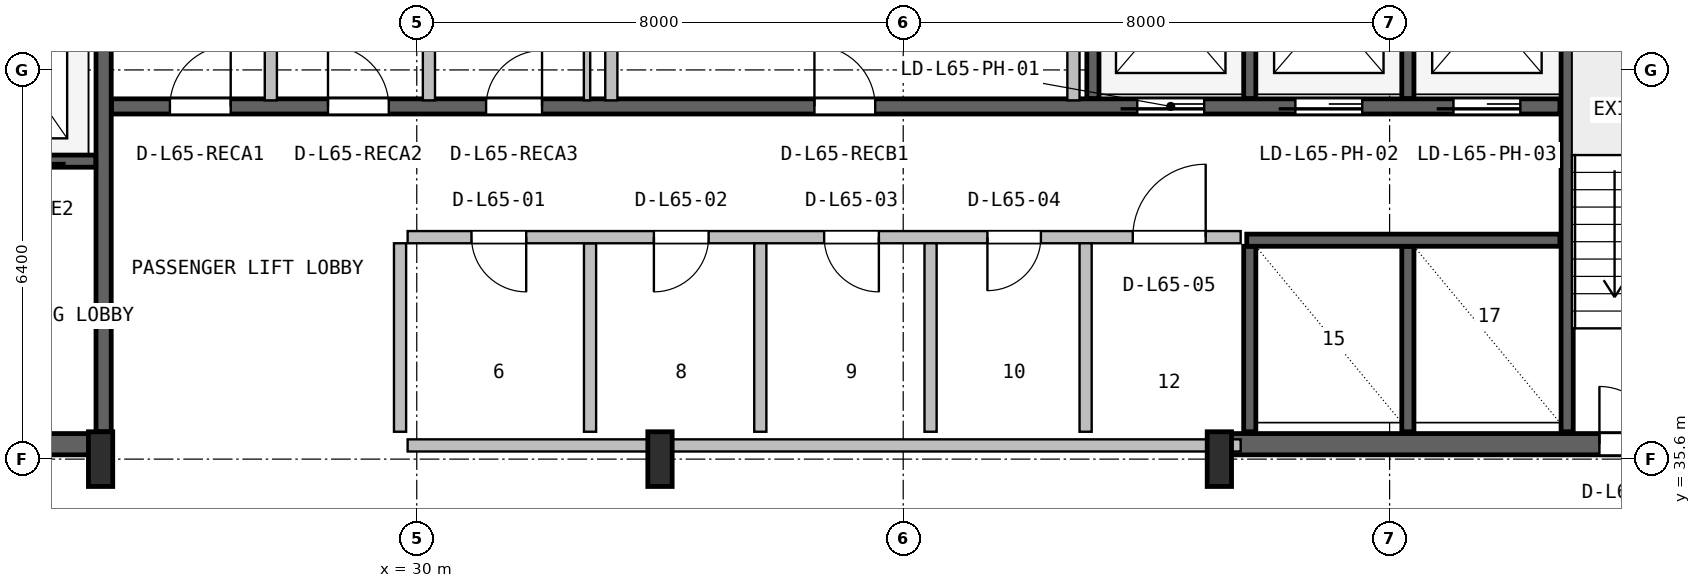
"""IFC4 building model, lengths in metres.
Left out: names, types, materials, properties, quantities, classifications, styles, units other than length and angle.
Written with IfcOpenShell. Run it as: python <this file> out.ifc"""

import sys

from ifc_helpers import new_model, si_unit, direction, frame, frame_2d, origin, origin_2d, place, context, subcontext, project, spatial, rectangle, i_section, extrude, source, transform, mapped, element, fill, save


model = new_model("IFC4")
c1 = context("Model", 3, precision=1e-05, world=origin(), true_north=direction((0.0, 1.0)))
c2 = subcontext(c1, "Body", "Model", "MODEL_VIEW")
j1 = project(units=[si_unit("LENGTHUNIT", "METRE"), si_unit("PLANEANGLEUNIT", "RADIAN")], contexts=[c1])
p1 = place(None, origin())
s1 = spatial("IfcSite", under=j1, at=p1, CompositionType="ELEMENT")
p2 = place(p1, origin())
s2 = spatial("IfcBuilding", under=s1, at=p2, CompositionType="ELEMENT")
p3 = place(p2, frame((0.0, 0.0, 262.2)))
s3 = spatial("IfcBuildingStorey", under=s2, at=p3, CompositionType="ELEMENT", Elevation=262.2)
p4 = place(p3, frame((15.67, 35.845, 0.0), z_axis=(0.0, 0.0, 1.0), x_axis=(1.0, 0.0, 0.0)))
e1 = element("IfcWall", 1, at=p4, inside=s3, PredefinedType="SHEAR", context=c2, shape_type="SweptSolid", body=[
    extrude(rectangle(XDim=9.13, YDim=0.35, at=frame_2d((4.565, 0.0))), origin(), (0.0, 0.0, 1.0), 3.55),
])
p5 = place(p4, frame((5.4, 0.0, 0.0)))
e2 = element("IfcOpeningElement", 2, at=p5, cuts=e1, PredefinedType="OPENING", context=c2, shape_type="SweptSolid", body=[
    extrude(rectangle(XDim=1.0, YDim=2.1, at=frame_2d((0.5, 1.05))), frame((0.0, 0.185, 0.0), z_axis=(0.0, -1.0, 0.0), x_axis=(1.0, 0.0, 0.0)), (0.0, 0.0, 1.0), 0.37),
])
p6 = place(p3, frame((43.2, 35.845, 0.0), z_axis=(0.0, 0.0, 1.0), x_axis=(1.0, 0.0, 0.0)))
e3 = element("IfcWall", 3, at=p6, inside=s3, PredefinedType="SHEAR", context=c2, shape_type="SweptSolid", body=[
    extrude(rectangle(XDim=9.13, YDim=0.35, at=frame_2d((4.565, 0.0))), origin(), (0.0, 0.0, 1.0), 3.55),
])
p7 = place(p6, frame((6.25, 0.0, 0.0)))
e4 = element("IfcOpeningElement", 4, at=p7, cuts=e3, PredefinedType="OPENING", context=c2, shape_type="SweptSolid", body=[
    extrude(rectangle(XDim=0.95, YDim=2.1, at=frame_2d((0.475, 1.05))), frame((0.0, 0.185, 0.0), z_axis=(0.0, -1.0, 0.0), x_axis=(1.0, 0.0, 0.0)), (0.0, 0.0, 1.0), 0.37),
])
m1 = source(origin(), c2, "Body", "SweptSolid", [
    extrude(i_section(OverallWidth=0.4, OverallDepth=0.9, WebThickness=0.016, FlangeThickness=0.028, FilletRadius=0.016, at=origin_2d()), origin(), (0.0, 0.0, 1.0), 3.8),
])
for number, where, z_axis, x_axis in (
    (5, (24.8, 35.6, 0.0), (0.0, 0.0, 1.0), (1.0, 0.0, 0.0)),
    (6, (34.0, 35.6, 0.0), (0.0, 0.0, 1.0), (1.0, 0.0, 0.0)),
    (7, (43.2, 35.6, 0.0), (0.0, 0.0, 1.0), (1.0, 0.0, 0.0)),
):
    element("IfcColumn", number, at=place(p3, frame(where, z_axis=z_axis, x_axis=x_axis)), inside=s3, PredefinedType="COLUMN", context=c2, shape_type="MappedRepresentation", body=[
        mapped(m1, transform((0.0, 0.0, 0.0), x_axis=(1.0, 0.0, 0.0), y_axis=(0.0, 1.0, 0.0), z_axis=(0.0, 0.0, 1.0), scale=1.0)),
    ])
p8 = place(p3, frame((24.85, 36.05, 0.0), z_axis=(0.0, 0.0, 1.0), x_axis=(0.0, 1.0, 0.0)))
e8 = element("IfcWall", 8, at=p8, inside=s3, PredefinedType="SHEAR", context=c2, shape_type="SweptSolid", body=[
    extrude(rectangle(XDim=10.45, YDim=0.25, at=frame_2d((5.225, 0.0))), origin(), (0.0, 0.0, 1.0), 3.55),
])
p9 = place(p3, frame((19.2, 40.5, 0.0), z_axis=(0.0, 0.0, 1.0), x_axis=(1.0, 0.0, 0.0)))
e9 = element("IfcWall", 9, at=p9, inside=s3, PredefinedType="SHEAR", context=c2, shape_type="SweptSolid", body=[
    extrude(rectangle(XDim=5.52, YDim=0.2, at=frame_2d((2.76, 0.0))), origin(), (0.0, 0.0, 1.0), 3.55),
])
p10 = place(p9, frame((1.05, 0.0, 0.0)))
e10 = element("IfcOpeningElement", 10, at=p10, cuts=e9, PredefinedType="OPENING", context=c2, shape_type="SweptSolid", body=[
    extrude(rectangle(XDim=1.1, YDim=2.18, at=frame_2d((0.55, 1.09))), frame((0.0, 0.11, 0.0), z_axis=(0.0, -1.0, 0.0), x_axis=(1.0, 0.0, 0.0)), (0.0, 0.0, 1.0), 0.22),
])
p11 = place(p9, frame((3.65, 0.0, 0.0)))
e11 = element("IfcOpeningElement", 11, at=p11, cuts=e9, PredefinedType="OPENING", context=c2, shape_type="SweptSolid", body=[
    extrude(rectangle(XDim=1.1, YDim=2.18, at=frame_2d((0.55, 1.09))), frame((0.0, 0.11, 0.0), z_axis=(0.0, -1.0, 0.0), x_axis=(1.0, 0.0, 0.0)), (0.0, 0.0, 1.0), 0.22),
])
p12 = place(p3, frame((48.92, 36.05, 0.0), z_axis=(0.0, 0.0, 1.0), x_axis=(0.0, 1.0, 0.0)))
e12 = element("IfcWall", 12, at=p12, inside=s3, PredefinedType="SHEAR", context=c2, shape_type="SweptSolid", body=[
    extrude(rectangle(XDim=10.5, YDim=0.2, at=frame_2d((5.25, 0.0))), origin(), (0.0, 0.0, 1.0), 3.55),
])
p13 = place(p3, frame((24.98, 41.4, 0.0), z_axis=(0.0, 0.0, 1.0), x_axis=(1.0, 0.0, 0.0)))
e13 = element("IfcWall", 13, at=p13, inside=s3, PredefinedType="SHEAR", context=c2, shape_type="SweptSolid", body=[
    extrude(rectangle(XDim=23.82, YDim=0.25, at=frame_2d((11.91, 0.0))), origin(), (0.0, 0.0, 1.0), 3.55),
])
p14 = place(p13, frame((16.87, 0.0, 0.0)))
e14 = element("IfcOpeningElement", 14, at=p14, cuts=e13, PredefinedType="OPENING", context=c2, shape_type="SweptSolid", body=[
    extrude(rectangle(XDim=1.1, YDim=2.18, at=frame_2d((0.55, 1.09))), frame((0.0, 0.135, 0.0), z_axis=(0.0, -1.0, 0.0), x_axis=(1.0, 0.0, 0.0)), (0.0, 0.0, 1.0), 0.27),
])
p15 = place(p13, frame((19.47, 0.0, 0.0)))
e15 = element("IfcOpeningElement", 15, at=p15, cuts=e13, PredefinedType="OPENING", context=c2, shape_type="SweptSolid", body=[
    extrude(rectangle(XDim=1.1, YDim=2.18, at=frame_2d((0.55, 1.09))), frame((0.0, 0.135, 0.0), z_axis=(0.0, -1.0, 0.0), x_axis=(1.0, 0.0, 0.0)), (0.0, 0.0, 1.0), 0.27),
])
p16 = place(p13, frame((22.07, 0.0, 0.0)))
e16 = element("IfcOpeningElement", 16, at=p16, cuts=e13, PredefinedType="OPENING", context=c2, shape_type="SweptSolid", body=[
    extrude(rectangle(XDim=1.1, YDim=2.18, at=frame_2d((0.55, 1.09))), frame((0.0, 0.135, 0.0), z_axis=(0.0, -1.0, 0.0), x_axis=(1.0, 0.0, 0.0)), (0.0, 0.0, 1.0), 0.27),
])
p17 = place(p13, frame((0.96, 0.0, 0.0)))
e17 = element("IfcOpeningElement", 17, at=p17, cuts=e13, PredefinedType="OPENING", context=c2, shape_type="SweptSolid", body=[
    extrude(rectangle(XDim=1.0, YDim=2.08, at=frame_2d((0.5, 1.04))), frame((0.0, 0.135, 0.0), z_axis=(0.0, -1.0, 0.0), x_axis=(1.0, 0.0, 0.0)), (0.0, 0.0, 1.0), 0.27),
])
p18 = place(p13, frame((3.56, 0.0, 0.0)))
e18 = element("IfcOpeningElement", 18, at=p18, cuts=e13, PredefinedType="OPENING", context=c2, shape_type="SweptSolid", body=[
    extrude(rectangle(XDim=1.0, YDim=2.08, at=frame_2d((0.5, 1.04))), frame((0.0, 0.135, 0.0), z_axis=(0.0, -1.0, 0.0), x_axis=(1.0, 0.0, 0.0)), (0.0, 0.0, 1.0), 0.27),
])
p19 = place(p13, frame((6.16, 0.0, 0.0)))
e19 = element("IfcOpeningElement", 19, at=p19, cuts=e13, PredefinedType="OPENING", context=c2, shape_type="SweptSolid", body=[
    extrude(rectangle(XDim=0.92, YDim=2.08, at=frame_2d((0.46, 1.04))), frame((0.0, 0.135, 0.0), z_axis=(0.0, -1.0, 0.0), x_axis=(1.0, 0.0, 0.0)), (0.0, 0.0, 1.0), 0.27),
])
p20 = place(p13, frame((11.56, 0.0, 0.0)))
e20 = element("IfcOpeningElement", 20, at=p20, cuts=e13, PredefinedType="OPENING", context=c2, shape_type="SweptSolid", body=[
    extrude(rectangle(XDim=1.0, YDim=2.08, at=frame_2d((0.5, 1.04))), frame((0.0, 0.135, 0.0), z_axis=(0.0, -1.0, 0.0), x_axis=(1.0, 0.0, 0.0)), (0.0, 0.0, 1.0), 0.27),
])
p21 = place(p3, frame((41.12, 41.53, 0.0), z_axis=(0.0, 0.0, 1.0), x_axis=(0.0, 1.0, 0.0)))
e21 = element("IfcWall", 21, at=p21, inside=s3, PredefinedType="SHEAR", context=c2, shape_type="SweptSolid", body=[
    extrude(rectangle(XDim=5.02, YDim=0.2, at=frame_2d((2.51, 0.0))), origin(), (0.0, 0.0, 1.0), 3.55),
])
for number, where, z_axis, x_axis in (
    (22, (43.7, 41.53, 0.0), (0.0, 0.0, 1.0), (0.0, 1.0, 0.0)),
    (23, (46.3, 41.53, 0.0), (0.0, 0.0, 1.0), (0.0, 1.0, 0.0)),
):
    element("IfcWall", number, at=place(p3, frame(where, z_axis=z_axis, x_axis=x_axis)), inside=s3, PredefinedType="SHEAR", context=c2, shape_type="SweptSolid", body=[
        extrude(rectangle(XDim=2.87, YDim=0.2, at=frame_2d((1.435, 0.0))), origin(), (0.0, 0.0, 1.0), 3.55),
    ])
for number, where, z_axis, x_axis in (
    (24, (43.7, 36.05, 0.0), (0.0, 0.0, 1.0), (0.0, 1.0, 0.0)),
    (25, (46.3, 36.05, 0.0), (0.0, 0.0, 1.0), (0.0, 1.0, 0.0)),
):
    element("IfcWall", number, at=place(p3, frame(where, z_axis=z_axis, x_axis=x_axis)), inside=s3, PredefinedType="SHEAR", context=c2, shape_type="SweptSolid", body=[
        extrude(rectangle(XDim=3.05, YDim=0.2, at=frame_2d((1.525, 0.0))), origin(), (0.0, 0.0, 1.0), 3.55),
    ])
p22 = place(p3, frame((43.65, 39.2, 0.0), z_axis=(0.0, 0.0, 1.0), x_axis=(1.0, 0.0, 0.0)))
e26 = element("IfcWall", 26, at=p22, inside=s3, PredefinedType="SHEAR", context=c2, shape_type="SweptSolid", body=[
    extrude(rectangle(XDim=5.15, YDim=0.2, at=frame_2d((2.575, 0.0))), origin(), (0.0, 0.0, 1.0), 3.55),
])
p23 = place(p3, frame((29.85, 35.825, 0.0), z_axis=(0.0, 0.0, 1.0), x_axis=(1.0, 0.0, 0.0)))
e27 = element("IfcWall", 27, at=p23, inside=s3, PredefinedType="SOLIDWALL", context=c2, shape_type="SweptSolid", body=[
    extrude(rectangle(XDim=13.7, YDim=0.2, at=frame_2d((6.85, 0.0))), origin(), (0.0, 0.0, 1.0), 2.575),
])
p24 = place(p3, frame((32.85, 36.05, 0.0), z_axis=(0.0, 0.0, 1.0), x_axis=(0.0, 1.0, 0.0)))
e28 = element("IfcWall", 28, at=p24, inside=s3, PredefinedType="PLUMBINGWALL", context=c2, shape_type="SweptSolid", body=[
    extrude(rectangle(XDim=3.1, YDim=0.2, at=frame_2d((1.55, 0.0))), origin(), (0.0, 0.0, 1.0), 3.53),
])
p25 = place(p3, frame((29.85, 39.25, 0.0), z_axis=(0.0, 0.0, 1.0), x_axis=(1.0, 0.0, 0.0)))
e29 = element("IfcWall", 29, at=p25, inside=s3, PredefinedType="SOLIDWALL", context=c2, shape_type="SweptSolid", body=[
    extrude(rectangle(XDim=13.7, YDim=0.2, at=frame_2d((6.85, 0.0))), origin(), (0.0, 0.0, 1.0), 3.53),
])
p26 = place(p25, frame((1.05, 0.0, 0.0)))
e30 = element("IfcOpeningElement", 30, at=p26, cuts=e29, PredefinedType="OPENING", context=c2, shape_type="SweptSolid", body=[
    extrude(rectangle(XDim=0.9, YDim=2.06, at=frame_2d((0.45, 1.03))), frame((0.0, 0.11, 0.0), z_axis=(0.0, -1.0, 0.0), x_axis=(1.0, 0.0, 0.0)), (0.0, 0.0, 1.0), 0.22),
])
p27 = place(p25, frame((4.05, 0.0, 0.0)))
e31 = element("IfcOpeningElement", 31, at=p27, cuts=e29, PredefinedType="OPENING", context=c2, shape_type="SweptSolid", body=[
    extrude(rectangle(XDim=0.9, YDim=2.06, at=frame_2d((0.45, 1.03))), frame((0.0, 0.11, 0.0), z_axis=(0.0, -1.0, 0.0), x_axis=(1.0, 0.0, 0.0)), (0.0, 0.0, 1.0), 0.22),
])
p28 = place(p25, frame((6.85, 0.0, 0.0)))
e32 = element("IfcOpeningElement", 32, at=p28, cuts=e29, PredefinedType="OPENING", context=c2, shape_type="SweptSolid", body=[
    extrude(rectangle(XDim=0.9, YDim=2.06, at=frame_2d((0.45, 1.03))), frame((0.0, 0.11, 0.0), z_axis=(0.0, -1.0, 0.0), x_axis=(1.0, 0.0, 0.0)), (0.0, 0.0, 1.0), 0.22),
])
p29 = place(p25, frame((9.535, 0.0, 0.0)))
e33 = element("IfcOpeningElement", 33, at=p29, cuts=e29, PredefinedType="OPENING", context=c2, shape_type="SweptSolid", body=[
    extrude(rectangle(XDim=0.88, YDim=2.06, at=frame_2d((0.44, 1.03))), frame((0.0, 0.11, 0.0), z_axis=(0.0, -1.0, 0.0), x_axis=(1.0, 0.0, 0.0)), (0.0, 0.0, 1.0), 0.22),
])
p30 = place(p25, frame((11.925, 0.0, 0.0)))
e34 = element("IfcOpeningElement", 34, at=p30, cuts=e29, PredefinedType="OPENING", context=c2, shape_type="SweptSolid", body=[
    extrude(rectangle(XDim=1.2, YDim=2.1, at=frame_2d((0.6, 1.05))), frame((0.0, 0.11, 0.0), z_axis=(0.0, -1.0, 0.0), x_axis=(1.0, 0.0, 0.0)), (0.0, 0.0, 1.0), 0.22),
])
for number, where, z_axis, x_axis in (
    (35, (29.725, 36.05, 0.0), (0.0, 0.0, 1.0), (0.0, 1.0, 0.0)),
    (36, (35.65, 36.05, 0.0), (0.0, 0.0, 1.0), (0.0, 1.0, 0.0)),
    (37, (38.45, 36.05, 0.0), (0.0, 0.0, 1.0), (0.0, 1.0, 0.0)),
):
    element("IfcWall", number, at=place(p3, frame(where, z_axis=z_axis, x_axis=x_axis)), inside=s3, PredefinedType="PLUMBINGWALL", context=c2, shape_type="SweptSolid", body=[
        extrude(rectangle(XDim=3.1, YDim=0.2, at=frame_2d((1.55, 0.0))), origin(), (0.0, 0.0, 1.0), 3.53),
    ])
p31 = place(p3, frame((41.0, 36.05, 0.0), z_axis=(0.0, 0.0, 1.0), x_axis=(0.0, 1.0, 0.0)))
e38 = element("IfcWall", 38, at=p31, inside=s3, PredefinedType="SOLIDWALL", context=c2, shape_type="SweptSolid", body=[
    extrude(rectangle(XDim=3.1, YDim=0.2, at=frame_2d((1.55, 0.0))), origin(), (0.0, 0.0, 1.0), 3.53),
])
for number, where, z_axis, x_axis in (
    (39, (27.6, 41.5, 0.0), (0.0, 0.0, 1.0), (0.0, 1.0, 0.0)),
    (40, (30.2, 41.5, 0.0), (0.0, 0.0, 1.0), (0.0, 1.0, 0.0)),
):
    element("IfcWall", number, at=place(p3, frame(where, z_axis=z_axis, x_axis=x_axis)), inside=s3, PredefinedType="SOLIDWALL", context=c2, shape_type="SweptSolid", body=[
        extrude(rectangle(XDim=5.02, YDim=0.2, at=frame_2d((2.51, 0.0))), origin(), (0.0, 0.0, 1.0), 3.53),
    ])
p32 = place(p3, frame((32.8, 41.5, 0.0), z_axis=(0.0, 0.0, 1.0), x_axis=(0.0, 1.0, 0.0)))
e41 = element("IfcWall", 41, at=p32, inside=s3, PredefinedType="PARTITIONING", context=c2, shape_type="SweptSolid", body=[
    extrude(rectangle(XDim=5.02, YDim=0.105, at=frame_2d((2.51, 0.0))), origin(), (0.0, 0.0, 1.0), 3.53),
])
for number, where, z_axis, x_axis in (
    (42, (40.8, 41.5, 0.0), (0.0, 0.0, 1.0), (0.0, 1.0, 0.0)),
    (43, (33.2, 41.5, 0.0), (0.0, 0.0, 1.0), (0.0, 1.0, 0.0)),
):
    element("IfcWall", number, at=place(p3, frame(where, z_axis=z_axis, x_axis=x_axis)), inside=s3, PredefinedType="SOLIDWALL", context=c2, shape_type="SweptSolid", body=[
        extrude(rectangle(XDim=5.02, YDim=0.2, at=frame_2d((2.51, 0.0))), origin(), (0.0, 0.0, 1.0), 3.53),
    ])
m2 = source(origin(), c2, "Body", "SweptSolid", [
    extrude(rectangle(XDim=0.95, YDim=2.1, at=frame_2d((0.475, 1.05))), frame((0.0, 0.025, 0.0), z_axis=(0.0, -1.0, 0.0), x_axis=(1.0, 0.0, 0.0)), (0.0, 0.0, 1.0), 0.05),
])
p33 = place(p7, origin())
e44 = element("IfcDoor", 44, at=p33, inside=s3, OperationType="SINGLE_SWING_LEFT", PredefinedType="DOOR", context=c2, shape_type="MappedRepresentation", body=[
    mapped(m2, transform((0.0, 0.0, 0.0), x_axis=(1.0, 0.0, 0.0), y_axis=(0.0, 1.0, 0.0), z_axis=(0.0, 0.0, 1.0), scale=1.0)),
])
fill(e4, e44)
m3 = source(origin(), c2, "Body", "SweptSolid", [
    extrude(rectangle(XDim=1.1, YDim=2.18, at=frame_2d((0.55, 1.09))), frame((0.0, 0.025, 0.0), z_axis=(0.0, -1.0, 0.0), x_axis=(1.0, 0.0, 0.0)), (0.0, 0.0, 1.0), 0.05),
])
p34 = place(p14, frame((1.1, 0.0, 0.0), z_axis=(0.0, 0.0, 1.0), x_axis=(-1.0, 0.0, 0.0)))
e45 = element("IfcDoor", 45, at=p34, inside=s3, OperationType="SLIDING_TO_LEFT", PredefinedType="DOOR", context=c2, shape_type="MappedRepresentation", body=[
    mapped(m3, transform((0.0, 0.0, 0.0), x_axis=(1.0, 0.0, 0.0), y_axis=(0.0, 1.0, 0.0), z_axis=(0.0, 0.0, 1.0), scale=1.0)),
])
fill(e14, e45)
p35 = place(p15, frame((1.1, 0.0, 0.0), z_axis=(0.0, 0.0, 1.0), x_axis=(-1.0, 0.0, 0.0)))
e46 = element("IfcDoor", 46, at=p35, inside=s3, OperationType="SLIDING_TO_LEFT", PredefinedType="DOOR", context=c2, shape_type="MappedRepresentation", body=[
    mapped(m3, transform((0.0, 0.0, 0.0), x_axis=(1.0, 0.0, 0.0), y_axis=(0.0, 1.0, 0.0), z_axis=(0.0, 0.0, 1.0), scale=1.0)),
])
fill(e15, e46)
p36 = place(p16, frame((1.1, 0.0, 0.0), z_axis=(0.0, 0.0, 1.0), x_axis=(-1.0, 0.0, 0.0)))
e47 = element("IfcDoor", 47, at=p36, inside=s3, OperationType="SLIDING_TO_LEFT", PredefinedType="DOOR", context=c2, shape_type="MappedRepresentation", body=[
    mapped(m3, transform((0.0, 0.0, 0.0), x_axis=(1.0, 0.0, 0.0), y_axis=(0.0, 1.0, 0.0), z_axis=(0.0, 0.0, 1.0), scale=1.0)),
])
fill(e16, e47)
m4 = source(origin(), c2, "Body", "SweptSolid", [
    extrude(rectangle(XDim=1.0, YDim=2.08, at=frame_2d((0.5, 1.04))), frame((0.0, 0.025, 0.0), z_axis=(0.0, -1.0, 0.0), x_axis=(1.0, 0.0, 0.0)), (0.0, 0.0, 1.0), 0.05),
])
p37 = place(p17, origin())
e48 = element("IfcDoor", 48, at=p37, inside=s3, OperationType="SINGLE_SWING_RIGHT", PredefinedType="DOOR", context=c2, shape_type="MappedRepresentation", body=[
    mapped(m4, transform((0.0, 0.0, 0.0), x_axis=(1.0, 0.0, 0.0), y_axis=(0.0, 1.0, 0.0), z_axis=(0.0, 0.0, 1.0), scale=1.0)),
])
fill(e17, e48)
p38 = place(p18, origin())
e49 = element("IfcDoor", 49, at=p38, inside=s3, OperationType="SINGLE_SWING_LEFT", PredefinedType="DOOR", context=c2, shape_type="MappedRepresentation", body=[
    mapped(m4, transform((0.0, 0.0, 0.0), x_axis=(1.0, 0.0, 0.0), y_axis=(0.0, 1.0, 0.0), z_axis=(0.0, 0.0, 1.0), scale=1.0)),
])
fill(e18, e49)
m5 = source(origin(), c2, "Body", "SweptSolid", [
    extrude(rectangle(XDim=0.92, YDim=2.08, at=frame_2d((0.46, 1.04))), frame((0.0, 0.025, 0.0), z_axis=(0.0, -1.0, 0.0), x_axis=(1.0, 0.0, 0.0)), (0.0, 0.0, 1.0), 0.05),
])
p39 = place(p19, origin())
e50 = element("IfcDoor", 50, at=p39, inside=s3, OperationType="SINGLE_SWING_RIGHT", PredefinedType="DOOR", context=c2, shape_type="MappedRepresentation", body=[
    mapped(m5, transform((0.0, 0.0, 0.0), x_axis=(1.0, 0.0, 0.0), y_axis=(0.0, 1.0, 0.0), z_axis=(0.0, 0.0, 1.0), scale=1.0)),
])
fill(e19, e50)
p40 = place(p20, origin())
e51 = element("IfcDoor", 51, at=p40, inside=s3, OperationType="SINGLE_SWING_LEFT", PredefinedType="DOOR", context=c2, shape_type="MappedRepresentation", body=[
    mapped(m4, transform((0.0, 0.0, 0.0), x_axis=(1.0, 0.0, 0.0), y_axis=(0.0, 1.0, 0.0), z_axis=(0.0, 0.0, 1.0), scale=1.0)),
])
fill(e20, e51)
m6 = source(origin(), c2, "Body", "SweptSolid", [
    extrude(rectangle(XDim=0.9, YDim=2.06, at=frame_2d((0.45, 1.03))), frame((0.0, 0.025, 0.0), z_axis=(0.0, -1.0, 0.0), x_axis=(1.0, 0.0, 0.0)), (0.0, 0.0, 1.0), 0.05),
])
p41 = place(p26, frame((0.9, 0.0, 0.0), z_axis=(0.0, 0.0, 1.0), x_axis=(-1.0, 0.0, 0.0)))
e52 = element("IfcDoor", 52, at=p41, inside=s3, OperationType="SINGLE_SWING_RIGHT", PredefinedType="DOOR", context=c2, shape_type="MappedRepresentation", body=[
    mapped(m6, transform((0.0, 0.0, 0.0), x_axis=(1.0, 0.0, 0.0), y_axis=(0.0, 1.0, 0.0), z_axis=(0.0, 0.0, 1.0), scale=1.0)),
])
fill(e30, e52)
p42 = place(p27, frame((0.9, 0.0, 0.0), z_axis=(0.0, 0.0, 1.0), x_axis=(-1.0, 0.0, 0.0)))
e53 = element("IfcDoor", 53, at=p42, inside=s3, OperationType="SINGLE_SWING_LEFT", PredefinedType="DOOR", context=c2, shape_type="MappedRepresentation", body=[
    mapped(m6, transform((0.0, 0.0, 0.0), x_axis=(1.0, 0.0, 0.0), y_axis=(0.0, 1.0, 0.0), z_axis=(0.0, 0.0, 1.0), scale=1.0)),
])
fill(e31, e53)
p43 = place(p28, frame((0.9, 0.0, 0.0), z_axis=(0.0, 0.0, 1.0), x_axis=(-1.0, 0.0, 0.0)))
e54 = element("IfcDoor", 54, at=p43, inside=s3, OperationType="SINGLE_SWING_RIGHT", PredefinedType="DOOR", context=c2, shape_type="MappedRepresentation", body=[
    mapped(m6, transform((0.0, 0.0, 0.0), x_axis=(1.0, 0.0, 0.0), y_axis=(0.0, 1.0, 0.0), z_axis=(0.0, 0.0, 1.0), scale=1.0)),
])
fill(e32, e54)
m7 = source(origin(), c2, "Body", "SweptSolid", [
    extrude(rectangle(XDim=0.88, YDim=2.06, at=frame_2d((0.44, 1.03))), frame((0.0, 0.025, 0.0), z_axis=(0.0, -1.0, 0.0), x_axis=(1.0, 0.0, 0.0)), (0.0, 0.0, 1.0), 0.05),
])
p44 = place(p29, frame((0.88, 0.0, 0.0), z_axis=(0.0, 0.0, 1.0), x_axis=(-1.0, 0.0, 0.0)))
e55 = element("IfcDoor", 55, at=p44, inside=s3, OperationType="SINGLE_SWING_LEFT", PredefinedType="DOOR", context=c2, shape_type="MappedRepresentation", body=[
    mapped(m7, transform((0.0, 0.0, 0.0), x_axis=(1.0, 0.0, 0.0), y_axis=(0.0, 1.0, 0.0), z_axis=(0.0, 0.0, 1.0), scale=1.0)),
])
fill(e33, e55)
m8 = source(origin(), c2, "Body", "SweptSolid", [
    extrude(rectangle(XDim=1.2, YDim=2.1, at=frame_2d((0.6, 1.05))), frame((0.0, 0.025, 0.0), z_axis=(0.0, -1.0, 0.0), x_axis=(1.0, 0.0, 0.0)), (0.0, 0.0, 1.0), 0.05),
])
p45 = place(p30, origin())
e56 = element("IfcDoor", 56, at=p45, inside=s3, OperationType="SINGLE_SWING_RIGHT", PredefinedType="DOOR", context=c2, shape_type="MappedRepresentation", body=[
    mapped(m8, transform((0.0, 0.0, 0.0), x_axis=(1.0, 0.0, 0.0), y_axis=(0.0, 1.0, 0.0), z_axis=(0.0, 0.0, 1.0), scale=1.0)),
])
fill(e34, e56)
save(model, sys.argv[1])
